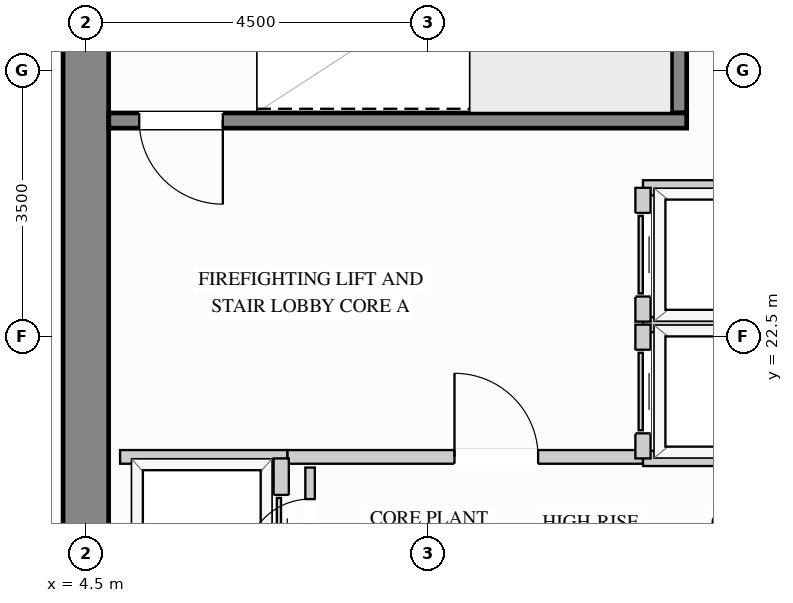
"""IFC4 building model, lengths in metres.
Left out: names, types, materials, properties, quantities, classifications, styles, units other than length and angle.
Written with IfcOpenShell. Run it as: python <this file> out.ifc"""

import sys

from ifc_helpers import new_model, si_unit, direction, frame, frame_2d, origin, place, context, subcontext, project, spatial, rectangle, extrude, source, transform, mapped, element, fill, save


model = new_model("IFC4")
c1 = context("Model", 3, precision=1e-05, world=origin(), true_north=direction((0.0, 1.0)))
c2 = subcontext(c1, "Body", "Model", "MODEL_VIEW")
j1 = project(units=[si_unit("LENGTHUNIT", "METRE"), si_unit("PLANEANGLEUNIT", "RADIAN")], contexts=[c1])
p1 = place(None, origin())
s1 = spatial("IfcSite", under=j1, at=p1, CompositionType="ELEMENT")
p2 = place(p1, origin())
s2 = spatial("IfcBuilding", under=s1, at=p2, CompositionType="ELEMENT")
p3 = place(p2, frame((0.0, 0.0, 143.1)))
s3 = spatial("IfcBuildingStorey", under=s2, at=p3, CompositionType="ELEMENT", Elevation=143.1)
m1 = source(origin(), c2, "Body", "SweptSolid", [
    extrude(rectangle(XDim=20.4, YDim=0.6, at=frame_2d((10.2, 0.0))), origin(), (0.0, 0.0, 1.0), 3.4),
])
p4 = place(p3, frame((4.5, 8.8, 0.0), z_axis=(0.0, 0.0, 1.0), x_axis=(0.0, 1.0, 0.0)))
e1 = element("IfcWall", 1, at=p4, inside=s3, PredefinedType="SHEAR", context=c2, shape_type="MappedRepresentation", body=[
    mapped(m1, transform((0.0, 0.0, 0.0), x_axis=(1.0, 0.0, 0.0), y_axis=(0.0, 1.0, 0.0), z_axis=(0.0, 0.0, 1.0))),
])
p5 = place(p3, frame((7.15, 20.92, 0.0), z_axis=(0.0, 0.0, 1.0), x_axis=(1.0, 0.0, 0.0)))
e2 = element("IfcWall", 2, at=p5, inside=s3, PredefinedType="PARTITIONING", context=c2, shape_type="SweptSolid", body=[
    extrude(rectangle(XDim=4.68, YDim=0.18, at=frame_2d((2.34, 0.0))), origin(), (0.0, 0.0, 1.0), 3.385),
])
p6 = place(p5, frame((2.2, 0.0, 0.0)))
e3 = element("IfcOpeningElement", 3, at=p6, cuts=e2, PredefinedType="OPENING", context=c2, shape_type="SweptSolid", body=[
    extrude(rectangle(XDim=1.1, YDim=2.15, at=frame_2d((0.55, 1.075))), frame((0.0, 0.1, 0.0), z_axis=(0.0, -1.0, 0.0), x_axis=(1.0, 0.0, 0.0)), (0.0, 0.0, 1.0), 0.2),
])
m2 = source(origin(), c2, "Body", "SweptSolid", [
    extrude(rectangle(XDim=2.2, YDim=0.18, at=frame_2d((1.1, 0.0))), origin(), (0.0, 0.0, 1.0), 3.385),
])
p7 = place(p3, frame((4.95, 20.92, 0.0), z_axis=(0.0, 0.0, 1.0), x_axis=(1.0, 0.0, 0.0)))
e4 = element("IfcWall", 4, at=p7, inside=s3, PredefinedType="PARTITIONING", context=c2, shape_type="MappedRepresentation", body=[
    mapped(m2, transform((0.0, 0.0, 0.0), x_axis=(1.0, 0.0, 0.0), y_axis=(0.0, 1.0, 0.0), z_axis=(0.0, 0.0, 1.0))),
])
p8 = place(p3, frame((7.45, 19.2, 0.0), z_axis=(0.0, 0.0, 1.0), x_axis=(0.0, 1.0, 0.0)))
e5 = element("IfcWall", 5, at=p8, inside=s3, PredefinedType="PARTITIONING", context=c2, shape_type="SweptSolid", body=[
    extrude(rectangle(XDim=1.58, YDim=0.125, at=frame_2d((0.79, 0.0))), origin(), (0.0, 0.0, 1.0), 3.385),
])
p9 = place(p8, frame((0.315, 0.0, 0.0)))
e6 = element("IfcOpeningElement", 6, at=p9, cuts=e5, PredefinedType="OPENING", context=c2, shape_type="SweptSolid", body=[
    extrude(rectangle(XDim=0.85, YDim=2.1, at=frame_2d((0.425, 1.05))), frame((0.0, 0.073, 0.0), z_axis=(0.0, -1.0, 0.0), x_axis=(1.0, 0.0, 0.0)), (0.0, 0.0, 1.0), 0.145),
])
m3 = source(origin(), c2, "Body", "SweptSolid", [
    extrude(rectangle(XDim=2.34, YDim=0.2, at=frame_2d((1.17, 0.0))), origin(), (0.0, 0.0, 1.0), 3.385),
])
for number, where, z_axis, x_axis in (
    (7, (11.83, 22.66, 0.0), (0.0, 0.0, 1.0), (1.0, 0.0, 0.0)),
    (8, (11.83, 20.9, 0.0), (0.0, 0.0, 1.0), (1.0, 0.0, 0.0)),
):
    element("IfcWall", number, at=place(p3, frame(where, z_axis=z_axis, x_axis=x_axis)), inside=s3, PredefinedType="PARTITIONING", context=c2, shape_type="MappedRepresentation", body=[
        mapped(m3, transform((0.0, 0.0, 0.0), x_axis=(1.0, 0.0, 0.0), y_axis=(0.0, 1.0, 0.0), z_axis=(0.0, 0.0, 1.0))),
    ])
p10 = place(p3, frame((11.83, 20.9, 0.0), z_axis=(0.0, 0.0, 1.0), x_axis=(0.0, 1.0, 0.0)))
e9 = element("IfcWall", 9, at=p10, inside=s3, PredefinedType="PARTITIONING", context=c2, shape_type="SweptSolid", body=[
    extrude(rectangle(XDim=1.76, YDim=0.2, at=frame_2d((0.88, 0.0))), origin(), (0.0, 0.0, 1.0), 3.385),
])
p11 = place(p10, frame((0.33, 0.0, 0.0)))
e10 = element("IfcOpeningElement", 10, at=p11, cuts=e9, PredefinedType="OPENING", context=c2, shape_type="SweptSolid", body=[
    extrude(rectangle(XDim=1.1, YDim=2.2, at=frame_2d((0.55, 1.1))), frame((0.0, 0.11, 0.0), z_axis=(0.0, -1.0, 0.0), x_axis=(1.0, 0.0, 0.0)), (0.0, 0.0, 1.0), 0.22),
])
p12 = place(p3, frame((11.83, 24.46, 0.0), z_axis=(0.0, 0.0, 1.0), x_axis=(1.0, 0.0, 0.0)))
e11 = element("IfcWall", 11, at=p12, inside=s3, PredefinedType="PARTITIONING", context=c2, shape_type="MappedRepresentation", body=[
    mapped(m3, transform((0.0, 0.0, 0.0), x_axis=(1.0, 0.0, 0.0), y_axis=(0.0, 1.0, 0.0), z_axis=(0.0, 0.0, 1.0))),
])
p13 = place(p3, frame((11.83, 22.7, 0.0), z_axis=(0.0, 0.0, 1.0), x_axis=(0.0, 1.0, 0.0)))
e12 = element("IfcWall", 12, at=p13, inside=s3, PredefinedType="PARTITIONING", context=c2, shape_type="SweptSolid", body=[
    extrude(rectangle(XDim=1.76, YDim=0.2, at=frame_2d((0.88, 0.0))), origin(), (0.0, 0.0, 1.0), 3.385),
])
p14 = place(p13, frame((0.33, 0.0, 0.0)))
e13 = element("IfcOpeningElement", 13, at=p14, cuts=e12, PredefinedType="OPENING", context=c2, shape_type="SweptSolid", body=[
    extrude(rectangle(XDim=1.1, YDim=2.2, at=frame_2d((0.55, 1.1))), frame((0.0, 0.11, 0.0), z_axis=(0.0, -1.0, 0.0), x_axis=(1.0, 0.0, 0.0)), (0.0, 0.0, 1.0), 0.22),
])
p15 = place(p3, frame((7.07, 18.84, 0.0), z_axis=(0.0, 0.0, 1.0), x_axis=(0.0, 1.0, 0.0)))
e14 = element("IfcWall", 14, at=p15, inside=s3, PredefinedType="PARTITIONING", context=c2, shape_type="SweptSolid", body=[
    extrude(rectangle(XDim=2.06, YDim=0.2, at=frame_2d((1.03, 0.0))), origin(), (0.0, 0.0, 1.0), 3.385),
])
p16 = place(p15, frame((0.48, 0.0, 0.0)))
e15 = element("IfcOpeningElement", 15, at=p16, cuts=e14, PredefinedType="OPENING", context=c2, shape_type="SweptSolid", body=[
    extrude(rectangle(XDim=1.1, YDim=2.2, at=frame_2d((0.55, 1.1))), frame((0.0, 0.11, 0.0), z_axis=(0.0, -1.0, 0.0), x_axis=(1.0, 0.0, 0.0)), (0.0, 0.0, 1.0), 0.22),
])
m4 = source(origin(), c2, "Body", "SweptSolid", [
    extrude(rectangle(XDim=3.753, YDim=0.2, at=frame_2d((1.876, 0.0))), origin(), (0.0, 0.0, 1.0), 3.4),
])
p17 = place(p3, frame((12.305, 25.445, 0.0), z_axis=(0.0, 0.0, 1.0), x_axis=(0.0, 1.0, 0.0)))
e16 = element("IfcWall", 16, at=p17, inside=s3, PredefinedType="SHEAR", context=c2, shape_type="MappedRepresentation", body=[
    mapped(m4, transform((0.0, 0.0, 0.0), x_axis=(1.0, 0.0, 0.0), y_axis=(0.0, 1.0, 0.0), z_axis=(0.0, 0.0, 1.0))),
])
p18 = place(p3, frame((4.802, 25.345, 0.0), z_axis=(0.0, 0.0, 1.0), x_axis=(1.0, 0.0, 0.0)))
e17 = element("IfcWall", 17, at=p18, inside=s3, PredefinedType="SHEAR", context=c2, shape_type="SweptSolid", body=[
    extrude(rectangle(XDim=7.603, YDim=0.2, at=frame_2d((3.802, 0.0))), origin(), (0.0, 0.0, 1.0), 3.4),
])
p19 = place(p18, frame((0.4, 0.0, 0.0)))
e18 = element("IfcOpeningElement", 18, at=p19, cuts=e17, PredefinedType="OPENING", context=c2, shape_type="SweptSolid", body=[
    extrude(rectangle(XDim=1.1, YDim=2.15, at=frame_2d((0.55, 1.075))), frame((0.0, 0.11, 0.0), z_axis=(0.0, -1.0, 0.0), x_axis=(1.0, 0.0, 0.0)), (0.0, 0.0, 1.0), 0.22),
])
m5 = source(origin(), c2, "Body", "SweptSolid", [
    extrude(rectangle(XDim=1.1, YDim=2.15, at=frame_2d((0.55, 1.075))), frame((0.0, 0.025, 0.0), z_axis=(0.0, -1.0, 0.0), x_axis=(1.0, 0.0, 0.0)), (0.0, 0.0, 1.0), 0.05),
])
p20 = place(p6, origin())
e19 = element("IfcDoor", 19, at=p20, inside=s3, OperationType="SINGLE_SWING_LEFT", PredefinedType="DOOR", context=c2, shape_type="MappedRepresentation", body=[
    mapped(m5, transform((0.0, 0.0, 0.0), x_axis=(1.0, 0.0, 0.0), y_axis=(0.0, 1.0, 0.0), z_axis=(0.0, 0.0, 1.0))),
])
fill(e3, e19)
m6 = source(origin(), c2, "Body", "SweptSolid", [
    extrude(rectangle(XDim=1.1, YDim=2.2, at=frame_2d((0.55, 1.1))), frame((0.0, 0.025, 0.0), z_axis=(0.0, -1.0, 0.0), x_axis=(1.0, 0.0, 0.0)), (0.0, 0.0, 1.0), 0.05),
])
p21 = place(p11, origin())
e20 = element("IfcDoor", 20, at=p21, inside=s3, OperationType="SLIDING_TO_LEFT", PredefinedType="DOOR", context=c2, shape_type="MappedRepresentation", body=[
    mapped(m6, transform((0.0, 0.0, 0.0), x_axis=(1.0, 0.0, 0.0), y_axis=(0.0, 1.0, 0.0), z_axis=(0.0, 0.0, 1.0))),
])
fill(e10, e20)
p22 = place(p14, origin())
e21 = element("IfcDoor", 21, at=p22, inside=s3, OperationType="SLIDING_TO_LEFT", PredefinedType="DOOR", context=c2, shape_type="MappedRepresentation", body=[
    mapped(m6, transform((0.0, 0.0, 0.0), x_axis=(1.0, 0.0, 0.0), y_axis=(0.0, 1.0, 0.0), z_axis=(0.0, 0.0, 1.0))),
])
fill(e13, e21)
p23 = place(p16, origin())
e22 = element("IfcDoor", 22, at=p23, inside=s3, OperationType="SLIDING_TO_LEFT", PredefinedType="DOOR", context=c2, shape_type="MappedRepresentation", body=[
    mapped(m6, transform((0.0, 0.0, 0.0), x_axis=(1.0, 0.0, 0.0), y_axis=(0.0, 1.0, 0.0), z_axis=(0.0, 0.0, 1.0))),
])
fill(e15, e22)
m7 = source(origin(), c2, "Body", "SweptSolid", [
    extrude(rectangle(XDim=0.85, YDim=2.1, at=frame_2d((0.425, 1.05))), frame((0.0, 0.025, 0.0), z_axis=(0.0, -1.0, 0.0), x_axis=(1.0, 0.0, 0.0)), (0.0, 0.0, 1.0), 0.05),
])
p24 = place(p9, origin())
e23 = element("IfcDoor", 23, at=p24, inside=s3, OperationType="SINGLE_SWING_LEFT", PredefinedType="DOOR", context=c2, shape_type="MappedRepresentation", body=[
    mapped(m7, transform((0.0, 0.0, 0.0), x_axis=(1.0, 0.0, 0.0), y_axis=(0.0, 1.0, 0.0), z_axis=(0.0, 0.0, 1.0))),
])
fill(e6, e23)
m8 = source(origin(), c2, "Body", "SweptSolid", [
    extrude(rectangle(XDim=1.1, YDim=2.15, at=frame_2d((0.55, 1.075))), frame((0.0, 0.025, 0.0), z_axis=(0.0, -1.0, 0.0), x_axis=(1.0, 0.0, 0.0)), (0.0, 0.0, 1.0), 0.05),
])
p25 = place(p19, origin())
e24 = element("IfcDoor", 24, at=p25, inside=s3, OperationType="SINGLE_SWING_RIGHT", PredefinedType="DOOR", context=c2, shape_type="MappedRepresentation", body=[
    mapped(m8, transform((0.0, 0.0, 0.0), x_axis=(1.0, 0.0, 0.0), y_axis=(0.0, 1.0, 0.0), z_axis=(0.0, 0.0, 1.0))),
])
fill(e18, e24)
save(model, sys.argv[1])
